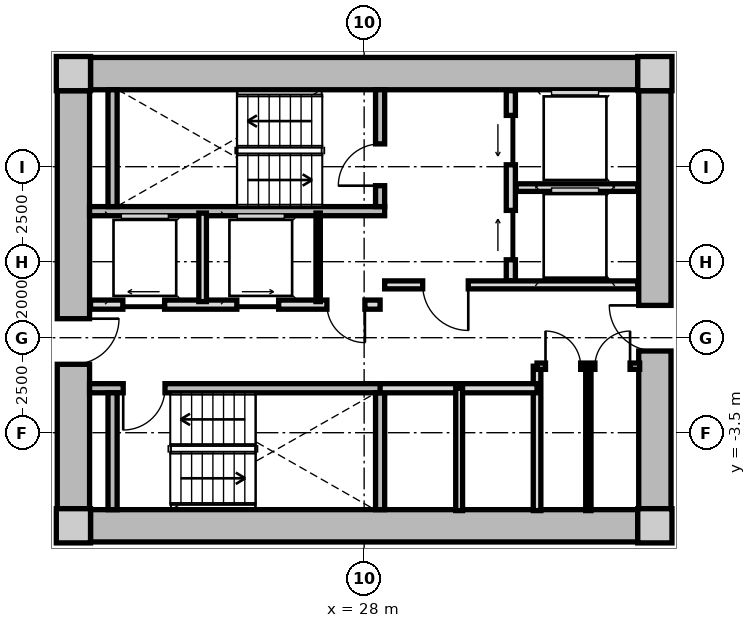
"""IFC4 building model, lengths in metres.
Left out: names, types, materials, properties, quantities, classifications, styles, units other than length and angle.
Written with IfcOpenShell. Run it as: python <this file> out.ifc"""

import sys

from ifc_helpers import new_model, si_unit, direction, frame, frame_2d, origin, origin_2d, place, context, subcontext, project, spatial, rectangle, extrude, source, transform, mapped, element, fill, save


model = new_model("IFC4")
c1 = context("Model", 3, precision=1e-05, world=origin(), true_north=direction((0.0, 1.0)))
c2 = subcontext(c1, "Body", "Model", "MODEL_VIEW")
j1 = project(units=[si_unit("LENGTHUNIT", "METRE"), si_unit("PLANEANGLEUNIT", "RADIAN")], contexts=[c1])
p1 = place(None, origin())
s1 = spatial("IfcSite", under=j1, at=p1, CompositionType="ELEMENT")
p2 = place(p1, origin())
s2 = spatial("IfcBuilding", under=s1, at=p2, CompositionType="ELEMENT")
p3 = place(p2, frame((0.0, 0.0, 52.1)))
s3 = spatial("IfcBuildingStorey", under=s2, at=p3, CompositionType="ELEMENT", Elevation=52.1)
m1 = source(origin(), c2, "Body", "SweptSolid", [
    extrude(rectangle(XDim=0.9, YDim=0.9, at=origin_2d()), origin(), (0.0, 0.0, 1.0), 3.05),
])
for number, where, z_axis, x_axis in (
    (1, (20.35, -5.95, 0.0), (0.0, 0.0, 1.0), (1.0, 0.0, 0.0)),
    (2, (35.65, -5.95, 0.0), (0.0, 0.0, 1.0), (1.0, 0.0, 0.0)),
    (3, (35.65, 5.95, 0.0), (0.0, 0.0, 1.0), (1.0, 0.0, 0.0)),
    (4, (20.35, 5.95, 0.0), (0.0, 0.0, 1.0), (1.0, 0.0, 0.0)),
):
    element("IfcColumn", number, at=place(p3, frame(where, z_axis=z_axis, x_axis=x_axis)), inside=s3, PredefinedType="COLUMN", context=c2, shape_type="MappedRepresentation", body=[
        mapped(m1, transform((0.0, 0.0, 0.0), x_axis=(1.0, 0.0, 0.0), y_axis=(0.0, 1.0, 0.0), z_axis=(0.0, 0.0, 1.0), scale=1.0)),
    ])
m2 = source(origin(), c2, "Body", "SweptSolid", [
    extrude(rectangle(XDim=14.4, YDim=0.85, at=frame_2d((7.2, 0.0))), origin(), (0.0, 0.0, 1.0), 2.79),
])
for number, where, z_axis, x_axis in (
    (5, (20.8, 5.95, 0.0), (0.0, 0.0, 1.0), (1.0, 0.0, 0.0)),
    (6, (35.2, -5.95, 0.0), (0.0, 0.0, 1.0), (-1.0, 0.0, 0.0)),
):
    element("IfcWall", number, at=place(p3, frame(where, z_axis=z_axis, x_axis=x_axis)), inside=s3, PredefinedType="SHEAR", context=c2, shape_type="MappedRepresentation", body=[
        mapped(m2, transform((0.0, 0.0, 0.0), x_axis=(1.0, 0.0, 0.0), y_axis=(0.0, 1.0, 0.0), z_axis=(0.0, 0.0, 1.0), scale=1.0)),
    ])
m3 = source(origin(), c2, "Body", "SweptSolid", [
    extrude(rectangle(XDim=11.0, YDim=0.85, at=frame_2d((5.5, 0.0))), origin(), (0.0, 0.0, 1.0), 2.79),
])
p4 = place(p3, frame((20.35, -5.5, 0.0), z_axis=(0.0, 0.0, 1.0), x_axis=(0.0, 1.0, 0.0)))
e7 = element("IfcWall", 7, at=p4, inside=s3, PredefinedType="SHEAR", context=c2, shape_type="MappedRepresentation", body=[
    mapped(m3, transform((0.0, 0.0, 0.0), x_axis=(1.0, 0.0, 0.0), y_axis=(0.0, 1.0, 0.0), z_axis=(0.0, 0.0, 1.0), scale=1.0)),
])
p5 = place(p4, frame((3.8, 0.0, 0.0)))
e8 = element("IfcOpeningElement", 8, at=p5, cuts=e7, PredefinedType="OPENING", context=c2, shape_type="SweptSolid", body=[
    extrude(rectangle(XDim=1.2, YDim=2.15, at=frame_2d((0.6, 1.075))), frame((0.0, 0.435, 0.0), z_axis=(0.0, -1.0, 0.0), x_axis=(1.0, 0.0, 0.0)), (0.0, 0.0, 1.0), 0.87),
])
p6 = place(p3, frame((35.65, 5.5, 0.0), z_axis=(0.0, 0.0, 1.0), x_axis=(0.0, -1.0, 0.0)))
e9 = element("IfcWall", 9, at=p6, inside=s3, PredefinedType="SHEAR", context=c2, shape_type="MappedRepresentation", body=[
    mapped(m3, transform((0.0, 0.0, 0.0), x_axis=(1.0, 0.0, 0.0), y_axis=(0.0, 1.0, 0.0), z_axis=(0.0, 0.0, 1.0), scale=1.0)),
])
p7 = place(p6, frame((5.65, 0.0, 0.0)))
e10 = element("IfcOpeningElement", 10, at=p7, cuts=e9, PredefinedType="OPENING", context=c2, shape_type="SweptSolid", body=[
    extrude(rectangle(XDim=1.2, YDim=2.15, at=frame_2d((0.6, 1.075))), frame((0.0, 0.435, 0.0), z_axis=(0.0, -1.0, 0.0), x_axis=(1.0, 0.0, 0.0)), (0.0, 0.0, 1.0), 0.87),
])
m4 = source(origin(), c2, "Body", "SweptSolid", [
    extrude(rectangle(XDim=7.765, YDim=0.24, at=frame_2d((3.883, 0.0))), origin(), (0.0, 0.0, 1.0), 2.79),
])
p8 = place(p3, frame((20.775, 2.33, 0.0), z_axis=(0.0, 0.0, 1.0), x_axis=(1.0, 0.0, 0.0)))
e11 = element("IfcWall", 11, at=p8, inside=s3, PredefinedType="PARTITIONING", context=c2, shape_type="MappedRepresentation", body=[
    mapped(m4, transform((0.0, 0.0, 0.0), x_axis=(1.0, 0.0, 0.0), y_axis=(0.0, 1.0, 0.0), z_axis=(0.0, 0.0, 1.0), scale=1.0)),
])
m5 = source(origin(), c2, "Body", "SweptSolid", [
    extrude(rectangle(XDim=3.075, YDim=0.24, at=frame_2d((1.538, 0.0))), origin(), (0.0, 0.0, 1.0), 2.79),
])
p9 = place(p3, frame((21.38, 2.45, 0.0), z_axis=(0.0, 0.0, 1.0), x_axis=(0.0, 1.0, 0.0)))
e12 = element("IfcWall", 12, at=p9, inside=s3, PredefinedType="PARTITIONING", context=c2, shape_type="MappedRepresentation", body=[
    mapped(m5, transform((0.0, 0.0, 0.0), x_axis=(1.0, 0.0, 0.0), y_axis=(0.0, 1.0, 0.0), z_axis=(0.0, 0.0, 1.0), scale=1.0)),
])
p10 = place(p3, frame((28.42, 2.45, 0.0), z_axis=(0.0, 0.0, 1.0), x_axis=(0.0, 1.0, 0.0)))
e13 = element("IfcWall", 13, at=p10, inside=s3, PredefinedType="PARTITIONING", context=c2, shape_type="MappedRepresentation", body=[
    mapped(m5, transform((0.0, 0.0, 0.0), x_axis=(1.0, 0.0, 0.0), y_axis=(0.0, 1.0, 0.0), z_axis=(0.0, 0.0, 1.0), scale=1.0)),
])
p11 = place(p10, frame((0.55, 0.0, 0.0)))
e14 = element("IfcOpeningElement", 14, at=p11, cuts=e13, PredefinedType="OPENING", context=c2, shape_type="SweptSolid", body=[
    extrude(rectangle(XDim=1.1, YDim=2.15, at=frame_2d((0.55, 1.075))), frame((0.0, 0.13, 0.0), z_axis=(0.0, -1.0, 0.0), x_axis=(1.0, 0.0, 0.0)), (0.0, 0.0, 1.0), 0.26),
])
p12 = place(p3, frame((20.775, -2.33, 0.0), z_axis=(0.0, 0.0, 1.0), x_axis=(1.0, 0.0, 0.0)))
e15 = element("IfcWall", 15, at=p12, inside=s3, PredefinedType="PARTITIONING", context=c2, shape_type="MappedRepresentation", body=[
    mapped(m4, transform((0.0, 0.0, 0.0), x_axis=(1.0, 0.0, 0.0), y_axis=(0.0, 1.0, 0.0), z_axis=(0.0, 0.0, 1.0), scale=1.0)),
])
p13 = place(p12, frame((0.885, 0.0, 0.0)))
e16 = element("IfcOpeningElement", 16, at=p13, cuts=e15, PredefinedType="OPENING", context=c2, shape_type="SweptSolid", body=[
    extrude(rectangle(XDim=1.1, YDim=2.15, at=frame_2d((0.55, 1.075))), frame((0.0, 0.13, 0.0), z_axis=(0.0, -1.0, 0.0), x_axis=(1.0, 0.0, 0.0)), (0.0, 0.0, 1.0), 0.26),
])
for number, where, z_axis, x_axis in (
    (17, (21.38, -5.525, 0.0), (0.0, 0.0, 1.0), (0.0, 1.0, 0.0)),
    (18, (28.42, -5.525, 0.0), (0.0, 0.0, 1.0), (0.0, 1.0, 0.0)),
):
    element("IfcWall", number, at=place(p3, frame(where, z_axis=z_axis, x_axis=x_axis)), inside=s3, PredefinedType="PARTITIONING", context=c2, shape_type="MappedRepresentation", body=[
        mapped(m5, transform((0.0, 0.0, 0.0), x_axis=(1.0, 0.0, 0.0), y_axis=(0.0, 1.0, 0.0), z_axis=(0.0, 0.0, 1.0), scale=1.0)),
    ])
m6 = source(origin(), c2, "Body", "SweptSolid", [
    extrude(rectangle(XDim=5.0, YDim=0.24, at=frame_2d((2.5, 0.0))), origin(), (0.0, 0.0, 1.0), 2.775),
])
p14 = place(p3, frame((31.86, 0.5, 0.0), z_axis=(0.0, 0.0, 1.0), x_axis=(0.0, 1.0, 0.0)))
e19 = element("IfcWall", 19, at=p14, inside=s3, PredefinedType="PARTITIONING", context=c2, shape_type="MappedRepresentation", body=[
    mapped(m6, transform((0.0, 0.0, 0.0), x_axis=(1.0, 0.0, 0.0), y_axis=(0.0, 1.0, 0.0), z_axis=(0.0, 0.0, 1.0), scale=1.0)),
])
p15 = place(p14, frame((3.05, 0.0, 0.0)))
e20 = element("IfcOpeningElement", 20, at=p15, cuts=e19, PredefinedType="OPENING", context=c2, shape_type="SweptSolid", body=[
    extrude(rectangle(XDim=1.3, YDim=2.2, at=frame_2d((0.65, 1.1))), frame((0.0, 0.13, 0.0), z_axis=(0.0, -1.0, 0.0), x_axis=(1.0, 0.0, 0.0)), (0.0, 0.0, 1.0), 0.26),
])
p16 = place(p14, frame((0.55, 0.0, 0.0)))
e21 = element("IfcOpeningElement", 21, at=p16, cuts=e19, PredefinedType="OPENING", context=c2, shape_type="SweptSolid", body=[
    extrude(rectangle(XDim=1.3, YDim=2.2, at=frame_2d((0.65, 1.1))), frame((0.0, 0.13, 0.0), z_axis=(0.0, -1.0, 0.0), x_axis=(1.0, 0.0, 0.0)), (0.0, 0.0, 1.0), 0.26),
])
m7 = source(origin(), c2, "Body", "SweptSolid", [
    extrude(rectangle(XDim=3.2, YDim=0.2, at=frame_2d((1.6, 0.0))), origin(), (0.0, 0.0, 1.0), 2.775),
])
p17 = place(p3, frame((32.0, 2.95, 0.0), z_axis=(0.0, 0.0, 1.0), x_axis=(1.0, 0.0, 0.0)))
e22 = element("IfcWall", 22, at=p17, inside=s3, PredefinedType="PARTITIONING", context=c2, shape_type="MappedRepresentation", body=[
    mapped(m7, transform((0.0, 0.0, 0.0), x_axis=(1.0, 0.0, 0.0), y_axis=(0.0, 1.0, 0.0), z_axis=(0.0, 0.0, 1.0), scale=1.0)),
])
m8 = source(origin(), c2, "Body", "SweptSolid", [
    extrude(rectangle(XDim=6.66, YDim=0.21, at=frame_2d((3.33, 0.0))), origin(), (0.0, 0.0, 1.0), 2.775),
])
p18 = place(p3, frame((28.54, 0.39, 0.0), z_axis=(0.0, 0.0, 1.0), x_axis=(1.0, 0.0, 0.0)))
e23 = element("IfcWall", 23, at=p18, inside=s3, PredefinedType="PARTITIONING", context=c2, shape_type="MappedRepresentation", body=[
    mapped(m8, transform((0.0, 0.0, 0.0), x_axis=(1.0, 0.0, 0.0), y_axis=(0.0, 1.0, 0.0), z_axis=(0.0, 0.0, 1.0), scale=1.0)),
])
p19 = place(p18, frame((1.0, 0.0, 0.0)))
e24 = element("IfcOpeningElement", 24, at=p19, cuts=e23, PredefinedType="OPENING", context=c2, shape_type="SweptSolid", body=[
    extrude(rectangle(XDim=1.2, YDim=2.15, at=frame_2d((0.6, 1.075))), frame((0.0, 0.115, 0.0), z_axis=(0.0, -1.0, 0.0), x_axis=(1.0, 0.0, 0.0)), (0.0, 0.0, 1.0), 0.23),
])
m9 = source(origin(), c2, "Body", "SweptSolid", [
    extrude(rectangle(XDim=7.62, YDim=0.24, at=frame_2d((3.81, 0.0))), origin(), (0.0, 0.0, 1.0), 2.775),
])
p20 = place(p3, frame((20.8, -0.13, 0.0), z_axis=(0.0, 0.0, 1.0), x_axis=(1.0, 0.0, 0.0)))
e25 = element("IfcWall", 25, at=p20, inside=s3, PredefinedType="PARTITIONING", context=c2, shape_type="MappedRepresentation", body=[
    mapped(m9, transform((0.0, 0.0, 0.0), x_axis=(1.0, 0.0, 0.0), y_axis=(0.0, 1.0, 0.0), z_axis=(0.0, 0.0, 1.0), scale=1.0)),
])
p21 = place(p20, frame((6.22, 0.0, 0.0)))
e26 = element("IfcOpeningElement", 26, at=p21, cuts=e25, PredefinedType="OPENING", context=c2, shape_type="SweptSolid", body=[
    extrude(rectangle(XDim=1.0, YDim=2.1, at=frame_2d((0.5, 1.05))), frame((0.0, 0.13, 0.0), z_axis=(0.0, -1.0, 0.0), x_axis=(1.0, 0.0, 0.0)), (0.0, 0.0, 1.0), 0.26),
])
p22 = place(p20, frame((0.85, 0.0, 0.0)))
e27 = element("IfcOpeningElement", 27, at=p22, cuts=e25, PredefinedType="OPENING", context=c2, shape_type="SweptSolid", body=[
    extrude(rectangle(XDim=1.1, YDim=2.2, at=frame_2d((0.55, 1.1))), frame((0.0, 0.13, 0.0), z_axis=(0.0, -1.0, 0.0), x_axis=(1.0, 0.0, 0.0)), (0.0, 0.0, 1.0), 0.26),
])
p23 = place(p20, frame((3.85, 0.0, 0.0)))
e28 = element("IfcOpeningElement", 28, at=p23, cuts=e25, PredefinedType="OPENING", context=c2, shape_type="SweptSolid", body=[
    extrude(rectangle(XDim=1.1, YDim=2.2, at=frame_2d((0.55, 1.1))), frame((0.0, 0.13, 0.0), z_axis=(0.0, -1.0, 0.0), x_axis=(1.0, 0.0, 0.0)), (0.0, 0.0, 1.0), 0.26),
])
m10 = source(origin(), c2, "Body", "SweptSolid", [
    extrude(rectangle(XDim=2.33, YDim=0.115, at=frame_2d((1.165, 0.0))), origin(), (0.0, 0.0, 1.0), 2.775),
])
p24 = place(p3, frame((26.79, -0.05, 0.0), z_axis=(0.0, 0.0, 1.0), x_axis=(0.0, 1.0, 0.0)))
e29 = element("IfcWall", 29, at=p24, inside=s3, PredefinedType="PARTITIONING", context=c2, shape_type="MappedRepresentation", body=[
    mapped(m10, transform((0.0, 0.0, 0.0), x_axis=(1.0, 0.0, 0.0), y_axis=(0.0, 1.0, 0.0), z_axis=(0.0, 0.0, 1.0), scale=1.0)),
])
m11 = source(origin(), c2, "Body", "SweptSolid", [
    extrude(rectangle(XDim=2.33, YDim=0.2, at=frame_2d((1.165, 0.0))), origin(), (0.0, 0.0, 1.0), 2.775),
])
p25 = place(p3, frame((23.75, -0.05, 0.0), z_axis=(0.0, 0.0, 1.0), x_axis=(0.0, 1.0, 0.0)))
e30 = element("IfcWall", 30, at=p25, inside=s3, PredefinedType="PARTITIONING", context=c2, shape_type="MappedRepresentation", body=[
    mapped(m11, transform((0.0, 0.0, 0.0), x_axis=(1.0, 0.0, 0.0), y_axis=(0.0, 1.0, 0.0), z_axis=(0.0, 0.0, 1.0), scale=1.0)),
])
m12 = source(origin(), c2, "Body", "SweptSolid", [
    extrude(rectangle(XDim=3.8, YDim=0.2, at=frame_2d((1.9, 0.0))), origin(), (0.0, 0.0, 1.0), 2.775),
])
p26 = place(p3, frame((32.55, -5.55, 0.0), z_axis=(0.0, 0.0, 1.0), x_axis=(0.0, 1.0, 0.0)))
e31 = element("IfcWall", 31, at=p26, inside=s3, PredefinedType="PARTITIONING", context=c2, shape_type="MappedRepresentation", body=[
    mapped(m12, transform((0.0, 0.0, 0.0), x_axis=(1.0, 0.0, 0.0), y_axis=(0.0, 1.0, 0.0), z_axis=(0.0, 0.0, 1.0), scale=1.0)),
])
m13 = source(origin(), c2, "Body", "SweptSolid", [
    extrude(rectangle(XDim=4.13, YDim=0.24, at=frame_2d((2.065, 0.0))), origin(), (0.0, 0.0, 1.0), 2.775),
])
p27 = place(p3, frame((28.42, -2.33, 0.0), z_axis=(0.0, 0.0, 1.0), x_axis=(1.0, 0.0, 0.0)))
e32 = element("IfcWall", 32, at=p27, inside=s3, PredefinedType="PARTITIONING", context=c2, shape_type="MappedRepresentation", body=[
    mapped(m13, transform((0.0, 0.0, 0.0), x_axis=(1.0, 0.0, 0.0), y_axis=(0.0, 1.0, 0.0), z_axis=(0.0, 0.0, 1.0), scale=1.0)),
])
m14 = source(origin(), c2, "Body", "SweptSolid", [
    extrude(rectangle(XDim=3.22, YDim=0.18, at=frame_2d((1.61, 0.0))), origin(), (0.0, 0.0, 1.0), 2.775),
])
p28 = place(p3, frame((30.5, -5.55, 0.0), z_axis=(0.0, 0.0, 1.0), x_axis=(0.0, 1.0, 0.0)))
e33 = element("IfcWall", 33, at=p28, inside=s3, PredefinedType="PARTITIONING", context=c2, shape_type="MappedRepresentation", body=[
    mapped(m14, transform((0.0, 0.0, 0.0), x_axis=(1.0, 0.0, 0.0), y_axis=(0.0, 1.0, 0.0), z_axis=(0.0, 0.0, 1.0), scale=1.0)),
])
m15 = source(origin(), c2, "Body", "SweptSolid", [
    extrude(rectangle(XDim=2.7, YDim=0.165, at=frame_2d((1.35, 0.0))), origin(), (0.0, 0.0, 1.0), 2.775),
])
p29 = place(p3, frame((32.55, -1.75, 0.0), z_axis=(0.0, 0.0, 1.0), x_axis=(1.0, 0.0, 0.0)))
e34 = element("IfcWall", 34, at=p29, inside=s3, PredefinedType="PARTITIONING", context=c2, shape_type="MappedRepresentation", body=[
    mapped(m15, transform((0.0, 0.0, 0.0), x_axis=(1.0, 0.0, 0.0), y_axis=(0.0, 1.0, 0.0), z_axis=(0.0, 0.0, 1.0), scale=1.0)),
])
p30 = place(p29, frame((0.222, 0.0, 0.0)))
e35 = element("IfcOpeningElement", 35, at=p30, cuts=e34, PredefinedType="OPENING", context=c2, shape_type="SweptSolid", body=[
    extrude(rectangle(XDim=0.925, YDim=2.1, at=frame_2d((0.462, 1.05))), frame((0.0, 0.093, 0.0), z_axis=(0.0, -1.0, 0.0), x_axis=(1.0, 0.0, 0.0)), (0.0, 0.0, 1.0), 0.185),
])
p31 = place(p29, frame((1.522, 0.0, 0.0)))
e36 = element("IfcOpeningElement", 36, at=p31, cuts=e34, PredefinedType="OPENING", context=c2, shape_type="SweptSolid", body=[
    extrude(rectangle(XDim=0.925, YDim=2.1, at=frame_2d((0.462, 1.05))), frame((0.0, 0.093, 0.0), z_axis=(0.0, -1.0, 0.0), x_axis=(1.0, 0.0, 0.0)), (0.0, 0.0, 1.0), 0.185),
])
m16 = source(origin(), c2, "Body", "SweptSolid", [
    extrude(rectangle(XDim=3.8, YDim=0.14, at=frame_2d((1.9, 0.0))), origin(), (0.0, 0.0, 1.0), 2.775),
])
p32 = place(p3, frame((33.9, -5.55, 0.0), z_axis=(0.0, 0.0, 1.0), x_axis=(0.0, 1.0, 0.0)))
e37 = element("IfcWall", 37, at=p32, inside=s3, PredefinedType="PARTITIONING", context=c2, shape_type="MappedRepresentation", body=[
    mapped(m16, transform((0.0, 0.0, 0.0), x_axis=(1.0, 0.0, 0.0), y_axis=(0.0, 1.0, 0.0), z_axis=(0.0, 0.0, 1.0), scale=1.0)),
])
m17 = source(origin(), c2, "Body", "SweptSolid", [
    extrude(rectangle(XDim=1.1, YDim=2.15, at=frame_2d((0.55, 1.075))), frame((0.0, 0.025, 0.0), z_axis=(0.0, -1.0, 0.0), x_axis=(1.0, 0.0, 0.0)), (0.0, 0.0, 1.0), 0.05),
])
p33 = place(p11, origin())
e38 = element("IfcDoor", 38, at=p33, inside=s3, OperationType="SINGLE_SWING_LEFT", PredefinedType="DOOR", context=c2, shape_type="MappedRepresentation", body=[
    mapped(m17, transform((0.0, 0.0, 0.0), x_axis=(1.0, 0.0, 0.0), y_axis=(0.0, 1.0, 0.0), z_axis=(0.0, 0.0, 1.0), scale=1.0)),
])
fill(e14, e38)
p34 = place(p13, frame((1.1, 0.0, 0.0), z_axis=(0.0, 0.0, 1.0), x_axis=(-1.0, 0.0, 0.0)))
e39 = element("IfcDoor", 39, at=p34, inside=s3, OperationType="SINGLE_SWING_RIGHT", PredefinedType="DOOR", context=c2, shape_type="MappedRepresentation", body=[
    mapped(m17, transform((0.0, 0.0, 0.0), x_axis=(1.0, 0.0, 0.0), y_axis=(0.0, 1.0, 0.0), z_axis=(0.0, 0.0, 1.0), scale=1.0)),
])
fill(e16, e39)
m18 = source(origin(), c2, "Body", "SweptSolid", [
    extrude(rectangle(XDim=1.3, YDim=2.2, at=frame_2d((0.65, 1.1))), frame((0.0, 0.025, 0.0), z_axis=(0.0, -1.0, 0.0), x_axis=(1.0, 0.0, 0.0)), (0.0, 0.0, 1.0), 0.05),
])
p35 = place(p15, origin())
e40 = element("IfcDoor", 40, at=p35, inside=s3, OperationType="SLIDING_TO_LEFT", PredefinedType="DOOR", context=c2, shape_type="MappedRepresentation", body=[
    mapped(m18, transform((0.0, 0.0, 0.0), x_axis=(1.0, 0.0, 0.0), y_axis=(0.0, 1.0, 0.0), z_axis=(0.0, 0.0, 1.0), scale=1.0)),
])
fill(e20, e40)
p36 = place(p16, origin())
e41 = element("IfcDoor", 41, at=p36, inside=s3, OperationType="SLIDING_TO_RIGHT", PredefinedType="DOOR", context=c2, shape_type="MappedRepresentation", body=[
    mapped(m18, transform((0.0, 0.0, 0.0), x_axis=(1.0, 0.0, 0.0), y_axis=(0.0, 1.0, 0.0), z_axis=(0.0, 0.0, 1.0), scale=1.0)),
])
fill(e21, e41)
m19 = source(origin(), c2, "Body", "SweptSolid", [
    extrude(rectangle(XDim=1.2, YDim=2.15, at=frame_2d((0.6, 1.075))), frame((0.0, 0.025, 0.0), z_axis=(0.0, -1.0, 0.0), x_axis=(1.0, 0.0, 0.0)), (0.0, 0.0, 1.0), 0.05),
])
p37 = place(p19, frame((1.2, 0.0, 0.0), z_axis=(0.0, 0.0, 1.0), x_axis=(-1.0, 0.0, 0.0)))
e42 = element("IfcDoor", 42, at=p37, inside=s3, OperationType="SINGLE_SWING_LEFT", PredefinedType="DOOR", context=c2, shape_type="MappedRepresentation", body=[
    mapped(m19, transform((0.0, 0.0, 0.0), x_axis=(1.0, 0.0, 0.0), y_axis=(0.0, 1.0, 0.0), z_axis=(0.0, 0.0, 1.0), scale=1.0)),
])
fill(e24, e42)
p38 = place(p5, frame((1.2, 0.0, 0.0), z_axis=(0.0, 0.0, 1.0), x_axis=(-1.0, 0.0, 0.0)))
e43 = element("IfcDoor", 43, at=p38, inside=s3, OperationType="SINGLE_SWING_LEFT", PredefinedType="DOOR", context=c2, shape_type="MappedRepresentation", body=[
    mapped(m19, transform((0.0, 0.0, 0.0), x_axis=(1.0, 0.0, 0.0), y_axis=(0.0, 1.0, 0.0), z_axis=(0.0, 0.0, 1.0), scale=1.0)),
])
fill(e8, e43)
p39 = place(p7, frame((1.2, 0.0, 0.0), z_axis=(0.0, 0.0, 1.0), x_axis=(-1.0, 0.0, 0.0)))
e44 = element("IfcDoor", 44, at=p39, inside=s3, OperationType="SINGLE_SWING_RIGHT", PredefinedType="DOOR", context=c2, shape_type="MappedRepresentation", body=[
    mapped(m19, transform((0.0, 0.0, 0.0), x_axis=(1.0, 0.0, 0.0), y_axis=(0.0, 1.0, 0.0), z_axis=(0.0, 0.0, 1.0), scale=1.0)),
])
fill(e10, e44)
m20 = source(origin(), c2, "Body", "SweptSolid", [
    extrude(rectangle(XDim=1.0, YDim=2.1, at=frame_2d((0.5, 1.05))), frame((0.0, 0.025, 0.0), z_axis=(0.0, -1.0, 0.0), x_axis=(1.0, 0.0, 0.0)), (0.0, 0.0, 1.0), 0.05),
])
p40 = place(p21, frame((1.0, 0.0, 0.0), z_axis=(0.0, 0.0, 1.0), x_axis=(-1.0, 0.0, 0.0)))
e45 = element("IfcDoor", 45, at=p40, inside=s3, OperationType="SINGLE_SWING_LEFT", PredefinedType="DOOR", context=c2, shape_type="MappedRepresentation", body=[
    mapped(m20, transform((0.0, 0.0, 0.0), x_axis=(1.0, 0.0, 0.0), y_axis=(0.0, 1.0, 0.0), z_axis=(0.0, 0.0, 1.0), scale=1.0)),
])
fill(e26, e45)
m21 = source(origin(), c2, "Body", "SweptSolid", [
    extrude(rectangle(XDim=1.1, YDim=2.2, at=frame_2d((0.55, 1.1))), frame((0.0, 0.025, 0.0), z_axis=(0.0, -1.0, 0.0), x_axis=(1.0, 0.0, 0.0)), (0.0, 0.0, 1.0), 0.05),
])
p41 = place(p22, origin())
e46 = element("IfcDoor", 46, at=p41, inside=s3, OperationType="SLIDING_TO_LEFT", PredefinedType="DOOR", context=c2, shape_type="MappedRepresentation", body=[
    mapped(m21, transform((0.0, 0.0, 0.0), x_axis=(1.0, 0.0, 0.0), y_axis=(0.0, 1.0, 0.0), z_axis=(0.0, 0.0, 1.0), scale=1.0)),
])
fill(e27, e46)
p42 = place(p23, origin())
e47 = element("IfcDoor", 47, at=p42, inside=s3, OperationType="SLIDING_TO_RIGHT", PredefinedType="DOOR", context=c2, shape_type="MappedRepresentation", body=[
    mapped(m21, transform((0.0, 0.0, 0.0), x_axis=(1.0, 0.0, 0.0), y_axis=(0.0, 1.0, 0.0), z_axis=(0.0, 0.0, 1.0), scale=1.0)),
])
fill(e28, e47)
m22 = source(origin(), c2, "Body", "SweptSolid", [
    extrude(rectangle(XDim=0.925, YDim=2.1, at=frame_2d((0.462, 1.05))), frame((0.0, 0.025, 0.0), z_axis=(0.0, -1.0, 0.0), x_axis=(1.0, 0.0, 0.0)), (0.0, 0.0, 1.0), 0.05),
])
p43 = place(p30, origin())
e48 = element("IfcDoor", 48, at=p43, inside=s3, OperationType="SINGLE_SWING_LEFT", PredefinedType="DOOR", context=c2, shape_type="MappedRepresentation", body=[
    mapped(m22, transform((0.0, 0.0, 0.0), x_axis=(1.0, 0.0, 0.0), y_axis=(0.0, 1.0, 0.0), z_axis=(0.0, 0.0, 1.0), scale=1.0)),
])
fill(e35, e48)
p44 = place(p31, origin())
e49 = element("IfcDoor", 49, at=p44, inside=s3, OperationType="SINGLE_SWING_RIGHT", PredefinedType="DOOR", context=c2, shape_type="MappedRepresentation", body=[
    mapped(m22, transform((0.0, 0.0, 0.0), x_axis=(1.0, 0.0, 0.0), y_axis=(0.0, 1.0, 0.0), z_axis=(0.0, 0.0, 1.0), scale=1.0)),
])
fill(e36, e49)
save(model, sys.argv[1])
